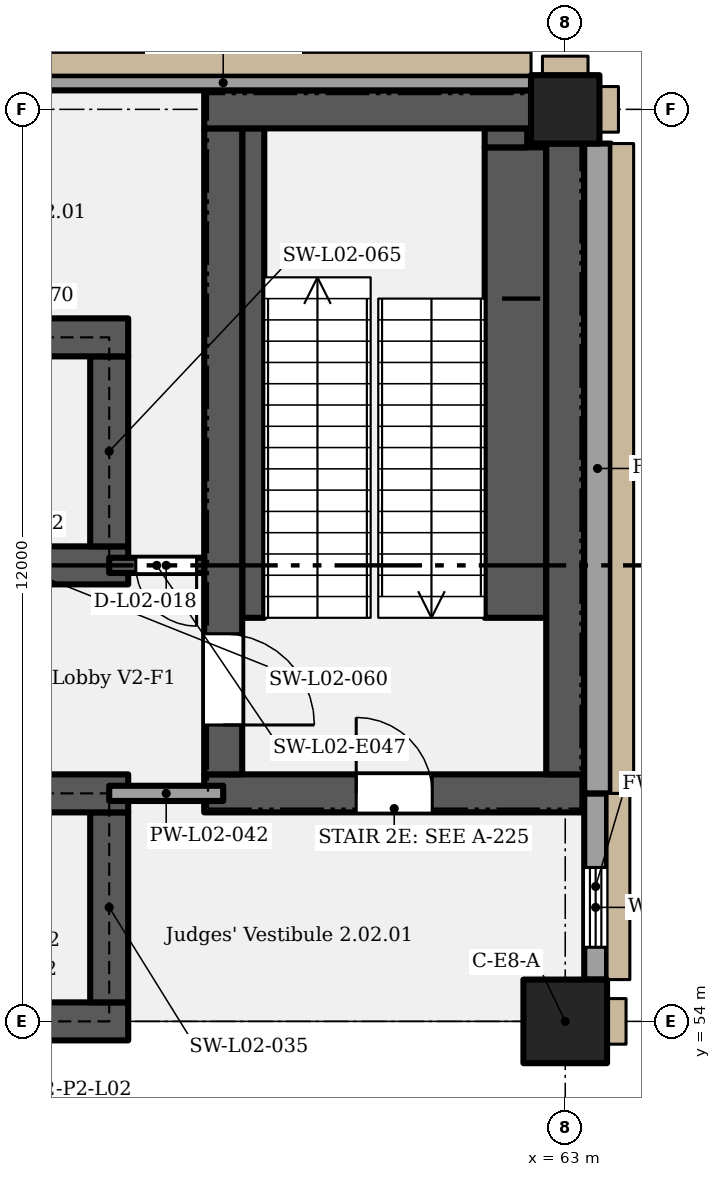
"""IFC4 building model, lengths in metres.
Left out: names, types, materials, properties, quantities, classifications, styles, units other than length and angle.
Written with IfcOpenShell. Run it as: python <this file> out.ifc"""

import sys

from ifc_helpers import new_model, si_unit, direction, frame, frame_2d, origin, origin_2d, place, context, subcontext, project, spatial, rectangle, extrude, element, fill, save


model = new_model("IFC4")
c1 = context("Model", 3, precision=1e-05, world=origin(), true_north=direction((0.0, 1.0)))
c2 = subcontext(c1, "Body", "Model", "MODEL_VIEW")
j1 = project(units=[si_unit("LENGTHUNIT", "METRE"), si_unit("PLANEANGLEUNIT", "RADIAN")], contexts=[c1])
p1 = place(None, origin())
s1 = spatial("IfcSite", under=j1, at=p1, CompositionType="ELEMENT")
p2 = place(p1, origin())
s2 = spatial("IfcBuilding", under=s1, at=p2, CompositionType="ELEMENT")
p3 = place(p2, frame((0.0, 0.0, 12.0)))
s3 = spatial("IfcBuildingStorey", under=s2, at=p3, CompositionType="ELEMENT", Elevation=12.0)
p4 = place(p3, frame((63.0, 54.0, 0.0), z_axis=(0.0, 0.0, 1.0), x_axis=(1.0, 0.0, 0.0)))
e1 = element("IfcColumn", 1, at=p4, inside=s3, PredefinedType="COLUMN", context=c2, shape_type="SweptSolid", body=[
    extrude(rectangle(XDim=1.1, YDim=1.1, at=origin_2d()), origin(), (0.0, 0.0, 1.0), 5.4),
])
p5 = place(p3, frame((63.0, 66.0, 0.0), z_axis=(0.0, 0.0, 1.0), x_axis=(1.0, 0.0, 0.0)))
e2 = element("IfcColumn", 2, at=p5, inside=s3, PredefinedType="COLUMN", context=c2, shape_type="SweptSolid", body=[
    extrude(rectangle(XDim=0.9, YDim=0.9, at=origin_2d()), origin(), (0.0, 0.0, 1.0), 5.4),
])
p6 = place(p3, frame((54.55, 54.0, 0.0), z_axis=(0.0, 0.0, 1.0), x_axis=(1.0, 0.0, 0.0)))
e3 = element("IfcWall", 3, at=p6, inside=s3, PredefinedType="SHEAR", context=c2, shape_type="SweptSolid", body=[
    extrude(rectangle(XDim=2.7, YDim=0.5, at=frame_2d((1.35, 0.0))), origin(), (0.0, 0.0, 1.0), 5.15),
])
p7 = place(p3, frame((57.0, 54.25, 0.0), z_axis=(0.0, 0.0, 1.0), x_axis=(0.0, 1.0, 0.0)))
e4 = element("IfcWall", 4, at=p7, inside=s3, PredefinedType="SHEAR", context=c2, shape_type="SweptSolid", body=[
    extrude(rectangle(XDim=2.5, YDim=0.5, at=frame_2d((1.25, 0.0))), origin(), (0.0, 0.0, 1.0), 5.15),
])
p8 = place(p3, frame((46.25, 57.0, 0.0), z_axis=(0.0, 0.0, 1.0), x_axis=(1.0, 0.0, 0.0)))
e5 = element("IfcWall", 5, at=p8, inside=s3, PredefinedType="SHEAR", context=c2, shape_type="SweptSolid", body=[
    extrude(rectangle(XDim=11.0, YDim=0.5, at=frame_2d((5.5, 0.0))), origin(), (0.0, 0.0, 1.0), 5.15),
])
p9 = place(p8, frame((4.9, 0.0, 0.0)))
e6 = element("IfcOpeningElement", 6, at=p9, cuts=e5, PredefinedType="OPENING", context=c2, shape_type="SweptSolid", body=[
    extrude(rectangle(XDim=1.2, YDim=2.1, at=frame_2d((0.6, 1.05))), frame((0.0, 0.26, 0.0), z_axis=(0.0, -1.0, 0.0), x_axis=(1.0, 0.0, 0.0)), (0.0, 0.0, 1.0), 0.52),
])
p10 = place(p3, frame((58.25, 57.0, 0.0), z_axis=(0.0, 0.0, 1.0), x_axis=(1.0, 0.0, 0.0)))
e7 = element("IfcWall", 7, at=p10, inside=s3, PredefinedType="SHEAR", context=c2, shape_type="SweptSolid", body=[
    extrude(rectangle(XDim=5.0, YDim=0.5, at=frame_2d((2.5, 0.0))), origin(), (0.0, 0.0, 1.0), 5.15),
])
p11 = place(p10, frame((2.0, 0.0, 0.0)))
e8 = element("IfcOpeningElement", 8, at=p11, cuts=e7, PredefinedType="OPENING", context=c2, shape_type="SweptSolid", body=[
    extrude(rectangle(XDim=1.0, YDim=2.1, at=frame_2d((0.5, 1.05))), frame((0.0, 0.26, 0.0), z_axis=(0.0, -1.0, 0.0), x_axis=(1.0, 0.0, 0.0)), (0.0, 0.0, 1.0), 0.52),
])
p12 = place(p3, frame((58.5, 57.25, 0.0), z_axis=(0.0, 0.0, 1.0), x_axis=(0.0, 1.0, 0.0)))
e9 = element("IfcWall", 9, at=p12, inside=s3, PredefinedType="SHEAR", context=c2, shape_type="SweptSolid", body=[
    extrude(rectangle(XDim=8.5, YDim=0.5, at=frame_2d((4.25, 0.0))), origin(), (0.0, 0.0, 1.0), 5.15),
])
p13 = place(p12, frame((1.85, 0.0, 0.0), z_axis=(0.0, 0.0, 1.0), x_axis=(-1.0, 0.0, 0.0)))
e10 = element("IfcOpeningElement", 10, at=p13, cuts=e9, PredefinedType="OPENING", context=c2, shape_type="SweptSolid", body=[
    extrude(rectangle(XDim=1.2, YDim=2.1, at=frame_2d((0.6, 1.05))), frame((0.0, 0.26, 0.0), z_axis=(0.0, -1.0, 0.0), x_axis=(1.0, 0.0, 0.0)), (0.0, 0.0, 1.0), 0.52),
])
p14 = place(p3, frame((63.0, 57.25, 0.0), z_axis=(0.0, 0.0, 1.0), x_axis=(0.0, 1.0, 0.0)))
e11 = element("IfcWall", 11, at=p14, inside=s3, PredefinedType="SHEAR", context=c2, shape_type="SweptSolid", body=[
    extrude(rectangle(XDim=8.3, YDim=0.5, at=frame_2d((4.15, 0.0))), origin(), (0.0, 0.0, 1.0), 5.15),
])
p15 = place(p3, frame((54.25, 60.0, 0.0), z_axis=(0.0, 0.0, 1.0), x_axis=(1.0, 0.0, 0.0)))
e12 = element("IfcWall", 12, at=p15, inside=s3, PredefinedType="SHEAR", context=c2, shape_type="SweptSolid", body=[
    extrude(rectangle(XDim=3.0, YDim=0.5, at=frame_2d((1.5, 0.0))), origin(), (0.0, 0.0, 1.0), 5.15),
])
p16 = place(p15, frame((0.7, 0.0, 0.0)))
e13 = element("IfcOpeningElement", 13, at=p16, cuts=e12, PredefinedType="OPENING", context=c2, shape_type="SweptSolid", body=[
    extrude(rectangle(XDim=1.1, YDim=2.1, at=frame_2d((0.55, 1.05))), frame((0.0, 0.26, 0.0), z_axis=(0.0, -1.0, 0.0), x_axis=(1.0, 0.0, 0.0)), (0.0, 0.0, 1.0), 0.52),
])
p17 = place(p3, frame((57.0, 60.25, 0.0), z_axis=(0.0, 0.0, 1.0), x_axis=(0.0, 1.0, 0.0)))
e14 = element("IfcWall", 14, at=p17, inside=s3, PredefinedType="SHEAR", context=c2, shape_type="SweptSolid", body=[
    extrude(rectangle(XDim=2.5, YDim=0.5, at=frame_2d((1.25, 0.0))), origin(), (0.0, 0.0, 1.0), 5.15),
])
p18 = place(p3, frame((54.25, 63.0, 0.0), z_axis=(0.0, 0.0, 1.0), x_axis=(1.0, 0.0, 0.0)))
e15 = element("IfcWall", 15, at=p18, inside=s3, PredefinedType="SHEAR", context=c2, shape_type="SweptSolid", body=[
    extrude(rectangle(XDim=3.0, YDim=0.5, at=frame_2d((1.5, 0.0))), origin(), (0.0, 0.0, 1.0), 5.15),
])
p19 = place(p3, frame((58.25, 66.0, 0.0), z_axis=(0.0, 0.0, 1.0), x_axis=(1.0, 0.0, 0.0)))
e16 = element("IfcWall", 16, at=p19, inside=s3, PredefinedType="SHEAR", context=c2, shape_type="SweptSolid", body=[
    extrude(rectangle(XDim=4.3, YDim=0.5, at=frame_2d((2.15, 0.0))), origin(), (0.0, 0.0, 1.0), 5.15),
])
p20 = place(p3, frame((54.45, 66.35, 0.0), z_axis=(0.0, 0.0, 1.0), x_axis=(1.0, 0.0, 0.0)))
e17 = element("IfcWall", 17, at=p20, inside=s3, PredefinedType="SOLIDWALL", context=c2, shape_type="SweptSolid", body=[
    extrude(rectangle(XDim=8.1, YDim=0.2, at=frame_2d((4.05, 0.0))), origin(), (0.0, 0.0, 1.0), 5.15),
])
p21 = place(p3, frame((63.4, 54.55, 0.0), z_axis=(0.0, 0.0, 1.0), x_axis=(0.0, 1.0, 0.0)))
e18 = element("IfcWall", 18, at=p21, inside=s3, PredefinedType="SOLIDWALL", context=c2, shape_type="SweptSolid", body=[
    extrude(rectangle(XDim=2.45, YDim=0.3, at=frame_2d((1.225, 0.0))), origin(), (0.0, 0.0, 1.0), 5.15),
])
p22 = place(p21, frame((0.425, 0.0, 1.05)))
e19 = element("IfcOpeningElement", 19, at=p22, cuts=e18, PredefinedType="OPENING", context=c2, shape_type="SweptSolid", body=[
    extrude(rectangle(XDim=1.05, YDim=2.4, at=frame_2d((0.525, 1.2))), frame((0.0, 0.16, 0.0), z_axis=(0.0, -1.0, 0.0), x_axis=(1.0, 0.0, 0.0)), (0.0, 0.0, 1.0), 0.32),
])
p23 = place(p3, frame((63.425, 57.0, 0.0), z_axis=(0.0, 0.0, 1.0), x_axis=(0.0, 1.0, 0.0)))
e20 = element("IfcWall", 20, at=p23, inside=s3, PredefinedType="SOLIDWALL", context=c2, shape_type="SweptSolid", body=[
    extrude(rectangle(XDim=8.55, YDim=0.35, at=frame_2d((4.275, 0.0))), origin(), (0.0, 0.0, 1.0), 5.15),
])
p24 = place(p3, frame((57.0, 57.0, 0.0), z_axis=(0.0, 0.0, 1.0), x_axis=(1.0, 0.0, 0.0)))
e21 = element("IfcWall", 21, at=p24, inside=s3, PredefinedType="PARTITIONING", context=c2, shape_type="SweptSolid", body=[
    extrude(rectangle(XDim=1.5, YDim=0.2, at=frame_2d((0.75, 0.0))), origin(), (0.0, 0.0, 1.0), 5.15),
])
p25 = place(p3, frame((57.0, 60.0, 0.0), z_axis=(0.0, 0.0, 1.0), x_axis=(1.0, 0.0, 0.0)))
e22 = element("IfcWall", 22, at=p25, inside=s3, PredefinedType="SHEAR", context=c2, shape_type="SweptSolid", body=[
    extrude(rectangle(XDim=1.25, YDim=0.2, at=frame_2d((0.625, 0.0))), origin(), (0.0, 0.0, 1.0), 5.15),
])
p26 = place(p25, frame((1.15, 0.0, 0.0), z_axis=(0.0, 0.0, 1.0), x_axis=(-1.0, 0.0, 0.0)))
e23 = element("IfcOpeningElement", 23, at=p26, cuts=e22, PredefinedType="OPENING", context=c2, shape_type="SweptSolid", body=[
    extrude(rectangle(XDim=0.8, YDim=2.0, at=frame_2d((0.4, 1.0))), frame((0.0, 0.11, 0.0), z_axis=(0.0, -1.0, 0.0), x_axis=(1.0, 0.0, 0.0)), (0.0, 0.0, 1.0), 0.22),
])
p27 = place(p3, frame((58.895, 59.31, 0.0), z_axis=(0.0, 0.0, 1.0), x_axis=(0.0, 1.0, 0.0)))
e24 = element("IfcWall", 24, at=p27, inside=s3, PredefinedType="SHEAR", context=c2, shape_type="SweptSolid", body=[
    extrude(rectangle(XDim=6.44, YDim=0.29, at=frame_2d((3.22, 0.0))), origin(), (0.0, 0.0, 1.0), 2.587),
])
p28 = place(p3, frame((62.345, 59.31, 0.0), z_axis=(0.0, 0.0, 1.0), x_axis=(0.0, 1.0, 0.0)))
e25 = element("IfcWall", 25, at=p28, inside=s3, PredefinedType="SHEAR", context=c2, shape_type="SweptSolid", body=[
    extrude(rectangle(XDim=6.19, YDim=0.81, at=frame_2d((3.095, 0.0))), origin(), (0.0, 0.0, 1.0), 2.587),
])
p29 = place(p3, frame((62.22, 65.5, 0.0), z_axis=(0.0, 0.0, 1.0), x_axis=(0.0, 1.0, 0.0)))
e26 = element("IfcWall", 26, at=p29, inside=s3, PredefinedType="SHEAR", context=c2, shape_type="SweptSolid", body=[
    extrude(rectangle(XDim=0.25, YDim=0.56, at=frame_2d((0.125, 0.0))), origin(), (0.0, 0.0, 1.0), 2.587),
])
p30 = place(p22, origin())
e27 = element("IfcWindow", 27, at=p30, inside=s3, PartitioningType="SINGLE_PANEL", PredefinedType="WINDOW", context=c2, shape_type="SweptSolid", body=[
    extrude(rectangle(XDim=1.05, YDim=2.4, at=frame_2d((0.525, 1.2))), frame((0.0, 0.03, 0.0), z_axis=(0.0, -1.0, 0.0), x_axis=(1.0, 0.0, 0.0)), (0.0, 0.0, 1.0), 0.06),
])
fill(e19, e27)
p31 = place(p13, origin())
e28 = element("IfcDoor", 28, at=p31, inside=s3, OperationType="SINGLE_SWING_RIGHT", PredefinedType="DOOR", context=c2, shape_type="SweptSolid", body=[
    extrude(rectangle(XDim=1.2, YDim=2.1, at=frame_2d((0.6, 1.05))), frame((0.0, 0.025, 0.0), z_axis=(0.0, -1.0, 0.0), x_axis=(1.0, 0.0, 0.0)), (0.0, 0.0, 1.0), 0.05),
])
fill(e10, e28)
p32 = place(p26, origin())
e29 = element("IfcDoor", 29, at=p32, inside=s3, OperationType="SINGLE_SWING_LEFT", PredefinedType="DOOR", context=c2, shape_type="SweptSolid", body=[
    extrude(rectangle(XDim=0.8, YDim=2.0, at=frame_2d((0.4, 1.0))), frame((0.0, 0.025, 0.0), z_axis=(0.0, -1.0, 0.0), x_axis=(1.0, 0.0, 0.0)), (0.0, 0.0, 1.0), 0.05),
])
fill(e23, e29)
p33 = place(p11, origin())
e30 = element("IfcDoor", 30, at=p33, inside=s3, OperationType="SINGLE_SWING_LEFT", PredefinedType="DOOR", context=c2, shape_type="SweptSolid", body=[
    extrude(rectangle(XDim=1.0, YDim=2.1, at=frame_2d((0.5, 1.05))), frame((0.0, 0.025, 0.0), z_axis=(0.0, -1.0, 0.0), x_axis=(1.0, 0.0, 0.0)), (0.0, 0.0, 1.0), 0.05),
])
fill(e8, e30)
save(model, sys.argv[1])
